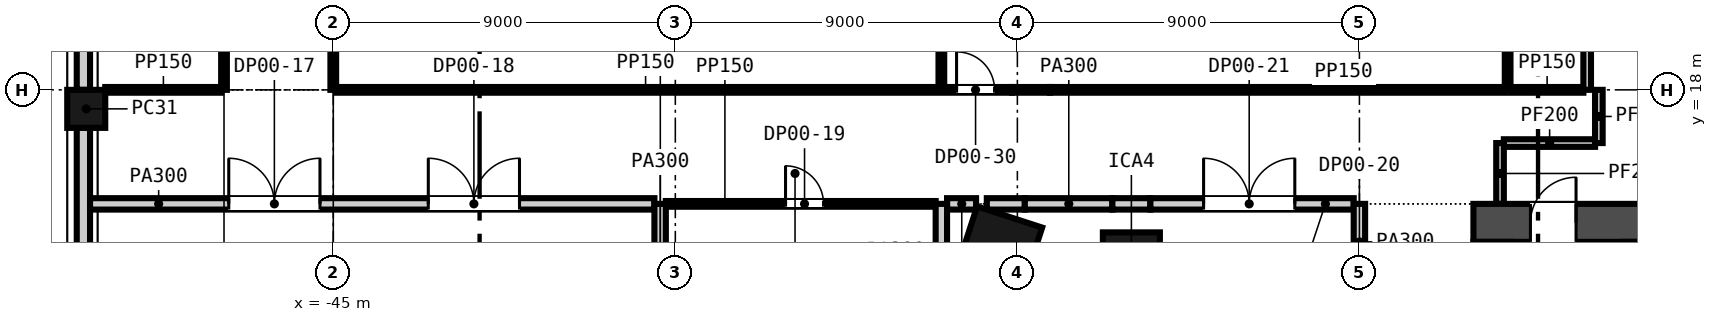
"""IFC4 building model, lengths in metres.
Left out: names, types, materials, properties, quantities, classifications, styles, units other than length and angle.
Written with IfcOpenShell. Run it as: python <this file> out.ifc"""

import sys

from ifc_helpers import new_model, si_unit, direction, frame, frame_2d, origin, origin_2d, place, context, subcontext, project, spatial, rectangle, extrude, element, fill, save


model = new_model("IFC4")
c1 = context("Model", 3, precision=1e-05, world=origin(), true_north=direction((0.0, 1.0)))
c2 = subcontext(c1, "Body", "Model", "MODEL_VIEW")
j1 = project(units=[si_unit("LENGTHUNIT", "METRE"), si_unit("PLANEANGLEUNIT", "RADIAN")], contexts=[c1])
p1 = place(None, origin())
s1 = spatial("IfcSite", under=j1, at=p1, CompositionType="ELEMENT")
p2 = place(p1, origin())
s2 = spatial("IfcBuilding", under=s1, at=p2, CompositionType="ELEMENT")
p3 = place(p2, origin())
s3 = spatial("IfcBuildingStorey", under=s2, at=p3, CompositionType="ELEMENT", Elevation=0.0)
p4 = place(p3, frame((-15.0, 14.5, -2.2), z_axis=(0.0, 0.0, 1.0), x_axis=(1.0, 0.0, 0.0)))
e1 = element("IfcWall", 1, at=p4, inside=s3, PredefinedType="SOLIDWALL", context=c2, shape_type="SweptSolid", body=[
    extrude(rectangle(XDim=30.0, YDim=1.0, at=frame_2d((15.0, 0.0))), origin(), (0.0, 0.0, 1.0), 10.8),
])
p5 = place(p4, frame((9.25, 0.0, 2.2)))
e2 = element("IfcOpeningElement", 2, at=p5, cuts=e1, PredefinedType="OPENING", context=c2, shape_type="SweptSolid", body=[
    extrude(rectangle(XDim=1.5, YDim=2.1, at=frame_2d((0.75, 1.05))), frame((0.0, 0.51, 0.0), z_axis=(0.0, -1.0, 0.0), x_axis=(1.0, 0.0, 0.0)), (0.0, 0.0, 1.0), 1.02),
])
p6 = place(p4, frame((19.4, 0.0, 2.2)))
e3 = element("IfcOpeningElement", 3, at=p6, cuts=e1, PredefinedType="OPENING", context=c2, shape_type="SweptSolid", body=[
    extrude(rectangle(XDim=1.5, YDim=2.1, at=frame_2d((0.75, 1.05))), frame((0.0, 0.51, 0.0), z_axis=(0.0, -1.0, 0.0), x_axis=(1.0, 0.0, 0.0)), (0.0, 0.0, 1.0), 1.02),
])
p7 = place(p4, frame((1.5, 0.0, 2.2)))
e4 = element("IfcOpeningElement", 4, at=p7, cuts=e1, PredefinedType="OPENING", context=c2, shape_type="SweptSolid", body=[
    extrude(rectangle(XDim=1.2, YDim=2.1, at=frame_2d((0.6, 1.05))), frame((0.0, 0.51, 0.0), z_axis=(0.0, -1.0, 0.0), x_axis=(1.0, 0.0, 0.0)), (0.0, 0.0, 1.0), 1.02),
])
p8 = place(p4, frame((27.3, 0.0, 2.2)))
e5 = element("IfcOpeningElement", 5, at=p8, cuts=e1, PredefinedType="OPENING", context=c2, shape_type="SweptSolid", body=[
    extrude(rectangle(XDim=1.2, YDim=2.1, at=frame_2d((0.6, 1.05))), frame((0.0, 0.51, 0.0), z_axis=(0.0, -1.0, 0.0), x_axis=(1.0, 0.0, 0.0)), (0.0, 0.0, 1.0), 1.02),
])
p9 = place(p3, frame((-27.482, 13.799, -0.3), z_axis=(0.0, 0.0, 1.0), x_axis=(-0.309016994375, -0.951056516295, 0.0)))
e6 = element("IfcColumn", 6, at=p9, inside=s3, PredefinedType="COLUMN", context=c2, shape_type="SweptSolid", body=[
    extrude(rectangle(XDim=1.8, YDim=1.8, at=origin_2d()), origin(), (0.0, 0.0, 1.0), 8.9),
])
p10 = place(p3, frame((-24.0, 13.5, -0.3), z_axis=(0.0, 0.0, 1.0), x_axis=(1.0, 0.0, 0.0)))
e7 = element("IfcColumn", 7, at=p10, inside=s3, PredefinedType="COLUMN", context=c2, shape_type="SweptSolid", body=[
    extrude(rectangle(XDim=1.5, YDim=1.5, at=origin_2d()), origin(), (0.0, 0.0, 1.0), 8.9),
])
p11 = place(p3, frame((-51.5, 17.5, -0.3), z_axis=(0.0, 0.0, 1.0), x_axis=(0.0, -1.0, 0.0)))
e8 = element("IfcColumn", 8, at=p11, inside=s3, PredefinedType="COLUMN", context=c2, shape_type="SweptSolid", body=[
    extrude(rectangle(XDim=1.0, YDim=1.0, at=origin_2d()), origin(), (0.0, 0.0, 1.0), 8.9),
])
for number, where, z_axis, x_axis in (
    (9, (-51.575, 25.75, -0.3), (0.0, 0.0, 1.0), (0.0, -1.0, 0.0)),
    (10, (-51.575, 17.0, -0.3), (0.0, 0.0, 1.0), (0.0, -1.0, 0.0)),
):
    element("IfcWall", number, at=place(p3, frame(where, z_axis=z_axis, x_axis=x_axis)), inside=s3, PredefinedType="SOLIDWALL", context=c2, shape_type="SweptSolid", body=[
        extrude(rectangle(XDim=7.75, YDim=0.35, at=frame_2d((3.875, 0.0))), origin(), (0.0, 0.0, 1.0), 8.0),
    ])
p12 = place(p3, frame((-51.4, 15.0, 0.0), z_axis=(0.0, 0.0, 1.0), x_axis=(1.0, 0.0, 0.0)))
e11 = element("IfcWall", 11, at=p12, inside=s3, PredefinedType="PARTITIONING", context=c2, shape_type="SweptSolid", body=[
    extrude(rectangle(XDim=14.85, YDim=0.3, at=frame_2d((7.425, 0.0))), origin(), (0.0, 0.0, 1.0), 8.6),
])
p13 = place(p12, frame((3.65, 0.0, 0.0)))
e12 = element("IfcOpeningElement", 12, at=p13, cuts=e11, PredefinedType="OPENING", context=c2, shape_type="SweptSolid", body=[
    extrude(rectangle(XDim=2.4, YDim=2.4, at=frame_2d((1.2, 1.2))), frame((0.0, 0.16, 0.0), z_axis=(0.0, -1.0, 0.0), x_axis=(1.0, 0.0, 0.0)), (0.0, 0.0, 1.0), 0.32),
])
p14 = place(p12, frame((8.9, 0.0, 0.0)))
e13 = element("IfcOpeningElement", 13, at=p14, cuts=e11, PredefinedType="OPENING", context=c2, shape_type="SweptSolid", body=[
    extrude(rectangle(XDim=2.4, YDim=2.4, at=frame_2d((1.2, 1.2))), frame((0.0, 0.16, 0.0), z_axis=(0.0, -1.0, 0.0), x_axis=(1.0, 0.0, 0.0)), (0.0, 0.0, 1.0), 0.32),
])
p15 = place(p3, frame((-36.25, 15.0, 0.0), z_axis=(0.0, 0.0, 1.0), x_axis=(1.0, 0.0, 0.0)))
e14 = element("IfcWall", 14, at=p15, inside=s3, PredefinedType="PARTITIONING", context=c2, shape_type="SweptSolid", body=[
    extrude(rectangle(XDim=7.1, YDim=0.15, at=frame_2d((3.55, 0.0))), origin(), (0.0, 0.0, 1.0), 8.6),
])
p16 = place(p15, frame((3.15, 0.0, 0.0)))
e15 = element("IfcOpeningElement", 15, at=p16, cuts=e14, PredefinedType="OPENING", context=c2, shape_type="SweptSolid", body=[
    extrude(rectangle(XDim=1.0, YDim=2.1, at=frame_2d((0.5, 1.05))), frame((0.0, 0.085, 0.0), z_axis=(0.0, -1.0, 0.0), x_axis=(1.0, 0.0, 0.0)), (0.0, 0.0, 1.0), 0.17),
])
p17 = place(p3, frame((-28.85, 15.0, 0.0), z_axis=(0.0, 0.0, 1.0), x_axis=(1.0, 0.0, 0.0)))
e16 = element("IfcWall", 16, at=p17, inside=s3, PredefinedType="PARTITIONING", context=c2, shape_type="SweptSolid", body=[
    extrude(rectangle(XDim=0.764, YDim=0.3, at=frame_2d((0.382, 0.0))), origin(), (0.0, 0.0, 1.0), 8.6),
])
p18 = place(p3, frame((-27.804, 15.0, 0.0), z_axis=(0.0, 0.0, 1.0), x_axis=(1.0, 0.0, 0.0)))
e17 = element("IfcWall", 17, at=p18, inside=s3, PredefinedType="PARTITIONING", context=c2, shape_type="SweptSolid", body=[
    extrude(rectangle(XDim=1.0, YDim=0.3, at=frame_2d((0.5, 0.0))), origin(), (0.0, 0.0, 1.0), 7.6),
])
p19 = place(p3, frame((-26.804, 15.0, 0.0), z_axis=(0.0, 0.0, 1.0), x_axis=(1.0, 0.0, 0.0)))
e18 = element("IfcWall", 18, at=p19, inside=s3, PredefinedType="PARTITIONING", context=c2, shape_type="SweptSolid", body=[
    extrude(rectangle(XDim=2.304, YDim=0.3, at=frame_2d((1.152, 0.0))), origin(), (0.0, 0.0, 1.0), 8.6),
])
p20 = place(p3, frame((-24.5, 15.0, 0.0), z_axis=(0.0, 0.0, 1.0), x_axis=(1.0, 0.0, 0.0)))
e19 = element("IfcWall", 19, at=p20, inside=s3, PredefinedType="PARTITIONING", context=c2, shape_type="SweptSolid", body=[
    extrude(rectangle(XDim=1.0, YDim=0.3, at=frame_2d((0.5, 0.0))), origin(), (0.0, 0.0, 1.0), 7.997),
])
p21 = place(p3, frame((-23.5, 15.0, 0.0), z_axis=(0.0, 0.0, 1.0), x_axis=(1.0, 0.0, 0.0)))
e20 = element("IfcWall", 20, at=p21, inside=s3, PredefinedType="PARTITIONING", context=c2, shape_type="SweptSolid", body=[
    extrude(rectangle(XDim=5.35, YDim=0.3, at=frame_2d((2.675, 0.0))), origin(), (0.0, 0.0, 1.0), 8.6),
])
p22 = place(p21, frame((1.4, 0.0, 0.0)))
e21 = element("IfcOpeningElement", 21, at=p22, cuts=e20, PredefinedType="OPENING", context=c2, shape_type="SweptSolid", body=[
    extrude(rectangle(XDim=2.4, YDim=2.4, at=frame_2d((1.2, 1.2))), frame((0.0, 0.16, 0.0), z_axis=(0.0, -1.0, 0.0), x_axis=(1.0, 0.0, 0.0)), (0.0, 0.0, 1.0), 0.32),
])
p23 = place(p3, frame((-14.2, 16.6, 0.0), z_axis=(0.0, 0.0, 1.0), x_axis=(1.0, 0.0, 0.0)))
e22 = element("IfcWall", 22, at=p23, inside=s3, PredefinedType="PARTITIONING", context=c2, shape_type="SweptSolid", body=[
    extrude(rectangle(XDim=2.4, YDim=0.2, at=frame_2d((1.2, 0.0))), origin(), (0.0, 0.0, 1.0), 8.6),
])
p24 = place(p3, frame((-51.0, 18.0, 0.0), z_axis=(0.0, 0.0, 1.0), x_axis=(1.0, 0.0, 0.0)))
e23 = element("IfcWall", 23, at=p24, inside=s3, PredefinedType="PARTITIONING", context=c2, shape_type="SweptSolid", body=[
    extrude(rectangle(XDim=3.05, YDim=0.15, at=frame_2d((1.525, 0.0))), origin(), (0.0, 0.0, 1.0), 8.6),
])
p25 = place(p3, frame((-44.925, 18.0, 0.0), z_axis=(0.0, 0.0, 1.0), x_axis=(1.0, 0.0, 0.0)))
e24 = element("IfcWall", 24, at=p25, inside=s3, PredefinedType="PARTITIONING", context=c2, shape_type="SweptSolid", body=[
    extrude(rectangle(XDim=17.783, YDim=0.15, at=frame_2d((8.891, 0.0))), origin(), (0.0, 0.0, 1.0), 8.6),
])
p26 = place(p25, frame((16.325, 0.0, 0.0)))
e25 = element("IfcOpeningElement", 25, at=p26, cuts=e24, PredefinedType="OPENING", context=c2, shape_type="SweptSolid", body=[
    extrude(rectangle(XDim=1.0, YDim=2.1, at=frame_2d((0.5, 1.05))), frame((0.0, 0.085, 0.0), z_axis=(0.0, -1.0, 0.0), x_axis=(1.0, 0.0, 0.0)), (0.0, 0.0, 1.0), 0.17),
])
p27 = place(p3, frame((-27.142, 18.0, 0.0), z_axis=(0.0, 0.0, 1.0), x_axis=(1.0, 0.0, 0.0)))
e26 = element("IfcWall", 26, at=p27, inside=s3, PredefinedType="PARTITIONING", context=c2, shape_type="SweptSolid", body=[
    extrude(rectangle(XDim=1.0, YDim=0.15, at=frame_2d((0.5, 0.0))), origin(), (0.0, 0.0, 1.0), 7.6),
])
p28 = place(p3, frame((-26.142, 18.0, 0.0), z_axis=(0.0, 0.0, 1.0), x_axis=(1.0, 0.0, 0.0)))
e27 = element("IfcWall", 27, at=p28, inside=s3, PredefinedType="PARTITIONING", context=c2, shape_type="SweptSolid", body=[
    extrude(rectangle(XDim=11.967, YDim=0.15, at=frame_2d((5.984, 0.0))), origin(), (0.0, 0.0, 1.0), 8.6),
])
p29 = place(p3, frame((-14.025, 18.0, 0.0), z_axis=(0.0, 0.0, 1.0), x_axis=(1.0, 0.0, 0.0)))
e28 = element("IfcWall", 28, at=p29, inside=s3, PredefinedType="PARTITIONING", context=c2, shape_type="SweptSolid", body=[
    extrude(rectangle(XDim=1.918, YDim=0.15, at=frame_2d((0.959, 0.0))), origin(), (0.0, 0.0, 1.0), 8.6),
])
p30 = place(p3, frame((-47.875, 18.0, 0.0), z_axis=(0.0, 0.0, 1.0), x_axis=(0.0, 1.0, 0.0)))
e29 = element("IfcWall", 29, at=p30, inside=s3, PredefinedType="PARTITIONING", context=c2, shape_type="SweptSolid", body=[
    extrude(rectangle(XDim=8.7, YDim=0.15, at=frame_2d((4.35, 0.0))), origin(), (0.0, 0.0, 1.0), 8.6),
])
p31 = place(p30, frame((3.65, 0.0, 0.0)))
e30 = element("IfcOpeningElement", 30, at=p31, cuts=e29, PredefinedType="OPENING", context=c2, shape_type="SweptSolid", body=[
    extrude(rectangle(XDim=0.9, YDim=2.1, at=frame_2d((0.45, 1.05))), frame((0.0, 0.085, 0.0), z_axis=(0.0, -1.0, 0.0), x_axis=(1.0, 0.0, 0.0)), (0.0, 0.0, 1.0), 0.17),
])
p32 = place(p3, frame((-45.0, 18.0, 0.0), z_axis=(0.0, 0.0, 1.0), x_axis=(0.0, 1.0, 0.0)))
e31 = element("IfcWall", 31, at=p32, inside=s3, PredefinedType="PARTITIONING", context=c2, shape_type="SweptSolid", body=[
    extrude(rectangle(XDim=7.431, YDim=0.15, at=frame_2d((3.715, 0.0))), origin(), (0.0, 0.0, 1.0), 8.6),
])
p33 = place(p32, frame((3.15, 0.0, 0.0)))
e32 = element("IfcOpeningElement", 32, at=p33, cuts=e31, PredefinedType="OPENING", context=c2, shape_type="SweptSolid", body=[
    extrude(rectangle(XDim=1.0, YDim=2.1, at=frame_2d((0.5, 1.05))), frame((0.0, 0.085, 0.0), z_axis=(0.0, -1.0, 0.0), x_axis=(1.0, 0.0, 0.0)), (0.0, 0.0, 1.0), 0.17),
])
p34 = place(p3, frame((-36.4, 12.011, 0.0), z_axis=(0.0, 0.0, 1.0), x_axis=(0.0, 1.0, 0.0)))
e33 = element("IfcWall", 33, at=p34, inside=s3, PredefinedType="PARTITIONING", context=c2, shape_type="SweptSolid", body=[
    extrude(rectangle(XDim=2.989, YDim=0.3, at=frame_2d((1.495, 0.0))), origin(), (0.0, 0.0, 1.0), 8.6),
])
p35 = place(p3, frame((-29.0, 12.524, 0.0), z_axis=(0.0, 0.0, 1.0), x_axis=(0.0, 1.0, 0.0)))
e34 = element("IfcWall", 34, at=p35, inside=s3, PredefinedType="PARTITIONING", context=c2, shape_type="SweptSolid", body=[
    extrude(rectangle(XDim=2.476, YDim=0.3, at=frame_2d((1.238, 0.0))), origin(), (0.0, 0.0, 1.0), 8.6),
])
p36 = place(p3, frame((-29.0, 18.075, 0.0), z_axis=(0.0, 0.0, 1.0), x_axis=(0.0, 1.0, 0.0)))
e35 = element("IfcWall", 35, at=p36, inside=s3, PredefinedType="PARTITIONING", context=c2, shape_type="SweptSolid", body=[
    extrude(rectangle(XDim=2.292, YDim=0.15, at=frame_2d((1.146, 0.0))), origin(), (0.0, 0.0, 1.0), 8.6),
])
p37 = place(p3, frame((-18.0, 13.0, 0.0), z_axis=(0.0, 0.0, 1.0), x_axis=(0.0, 1.0, 0.0)))
e36 = element("IfcWall", 36, at=p37, inside=s3, PredefinedType="PARTITIONING", context=c2, shape_type="SweptSolid", body=[
    extrude(rectangle(XDim=2.0, YDim=0.3, at=frame_2d((1.0, 0.0))), origin(), (0.0, 0.0, 1.0), 7.994),
])
p38 = place(p3, frame((-14.3, 15.0, 0.0), z_axis=(0.0, 0.0, 1.0), x_axis=(0.0, 1.0, 0.0)))
e37 = element("IfcWall", 37, at=p38, inside=s3, PredefinedType="PARTITIONING", context=c2, shape_type="SweptSolid", body=[
    extrude(rectangle(XDim=1.6, YDim=0.2, at=frame_2d((0.8, 0.0))), origin(), (0.0, 0.0, 1.0), 8.6),
])
p39 = place(p3, frame((-14.1, 18.001, 0.0), z_axis=(0.0, 0.0, 1.0), x_axis=(0.0, 1.0, 0.0)))
e38 = element("IfcWall", 38, at=p39, inside=s3, PredefinedType="PARTITIONING", context=c2, shape_type="SweptSolid", body=[
    extrude(rectangle(XDim=8.249, YDim=0.15, at=frame_2d((4.125, 0.0))), origin(), (0.0, 0.0, 1.0), 8.6),
])
p40 = place(p3, frame((-12.007, 18.001, 0.0), z_axis=(0.0, 0.0, 1.0), x_axis=(0.0, 1.0, 0.0)))
e39 = element("IfcWall", 39, at=p40, inside=s3, PredefinedType="PARTITIONING", context=c2, shape_type="SweptSolid", body=[
    extrude(rectangle(XDim=12.199, YDim=0.2, at=frame_2d((6.1, 0.0))), origin(), (0.0, 0.0, 1.0), 8.6),
])
p41 = place(p3, frame((-11.7, 16.6, 0.0), z_axis=(0.0, 0.0, 1.0), x_axis=(0.0, 1.0, 0.0)))
e40 = element("IfcWall", 40, at=p41, inside=s3, PredefinedType="PARTITIONING", context=c2, shape_type="SweptSolid", body=[
    extrude(rectangle(XDim=1.4, YDim=0.2, at=frame_2d((0.7, 0.0))), origin(), (0.0, 0.0, 1.0), 8.6),
])
p42 = place(p7, origin())
e41 = element("IfcDoor", 41, at=p42, inside=s3, OperationType="SINGLE_SWING_RIGHT", PredefinedType="DOOR", context=c2, shape_type="SweptSolid", body=[
    extrude(rectangle(XDim=1.2, YDim=2.1, at=frame_2d((0.6, 1.05))), frame((0.0, 0.025, 0.0), z_axis=(0.0, -1.0, 0.0), x_axis=(1.0, 0.0, 0.0)), (0.0, 0.0, 1.0), 0.05),
])
fill(e4, e41)
p43 = place(p13, origin())
e42 = element("IfcDoor", 42, at=p43, inside=s3, OperationType="SINGLE_SWING_LEFT", PredefinedType="DOOR", context=c2, shape_type="SweptSolid", body=[
    extrude(rectangle(XDim=2.4, YDim=2.4, at=frame_2d((1.2, 1.2))), frame((0.0, 0.025, 0.0), z_axis=(0.0, -1.0, 0.0), x_axis=(1.0, 0.0, 0.0)), (0.0, 0.0, 1.0), 0.05),
])
fill(e12, e42)
p44 = place(p14, origin())
e43 = element("IfcDoor", 43, at=p44, inside=s3, OperationType="SINGLE_SWING_LEFT", PredefinedType="DOOR", context=c2, shape_type="SweptSolid", body=[
    extrude(rectangle(XDim=2.4, YDim=2.4, at=frame_2d((1.2, 1.2))), frame((0.0, 0.025, 0.0), z_axis=(0.0, -1.0, 0.0), x_axis=(1.0, 0.0, 0.0)), (0.0, 0.0, 1.0), 0.05),
])
fill(e13, e43)
p45 = place(p16, origin())
e44 = element("IfcDoor", 44, at=p45, inside=s3, OperationType="SINGLE_SWING_LEFT", PredefinedType="DOOR", context=c2, shape_type="SweptSolid", body=[
    extrude(rectangle(XDim=1.0, YDim=2.1, at=frame_2d((0.5, 1.05))), frame((0.0, 0.025, 0.0), z_axis=(0.0, -1.0, 0.0), x_axis=(1.0, 0.0, 0.0)), (0.0, 0.0, 1.0), 0.05),
])
fill(e15, e44)
p46 = place(p22, origin())
e45 = element("IfcDoor", 45, at=p46, inside=s3, OperationType="SINGLE_SWING_LEFT", PredefinedType="DOOR", context=c2, shape_type="SweptSolid", body=[
    extrude(rectangle(XDim=2.4, YDim=2.4, at=frame_2d((1.2, 1.2))), frame((0.0, 0.025, 0.0), z_axis=(0.0, -1.0, 0.0), x_axis=(1.0, 0.0, 0.0)), (0.0, 0.0, 1.0), 0.05),
])
fill(e21, e45)
p47 = place(p26, origin())
e46 = element("IfcDoor", 46, at=p47, inside=s3, OperationType="SINGLE_SWING_LEFT", PredefinedType="DOOR", context=c2, shape_type="SweptSolid", body=[
    extrude(rectangle(XDim=1.0, YDim=2.1, at=frame_2d((0.5, 1.05))), frame((0.0, 0.025, 0.0), z_axis=(0.0, -1.0, 0.0), x_axis=(1.0, 0.0, 0.0)), (0.0, 0.0, 1.0), 0.05),
])
fill(e25, e46)
save(model, sys.argv[1])
